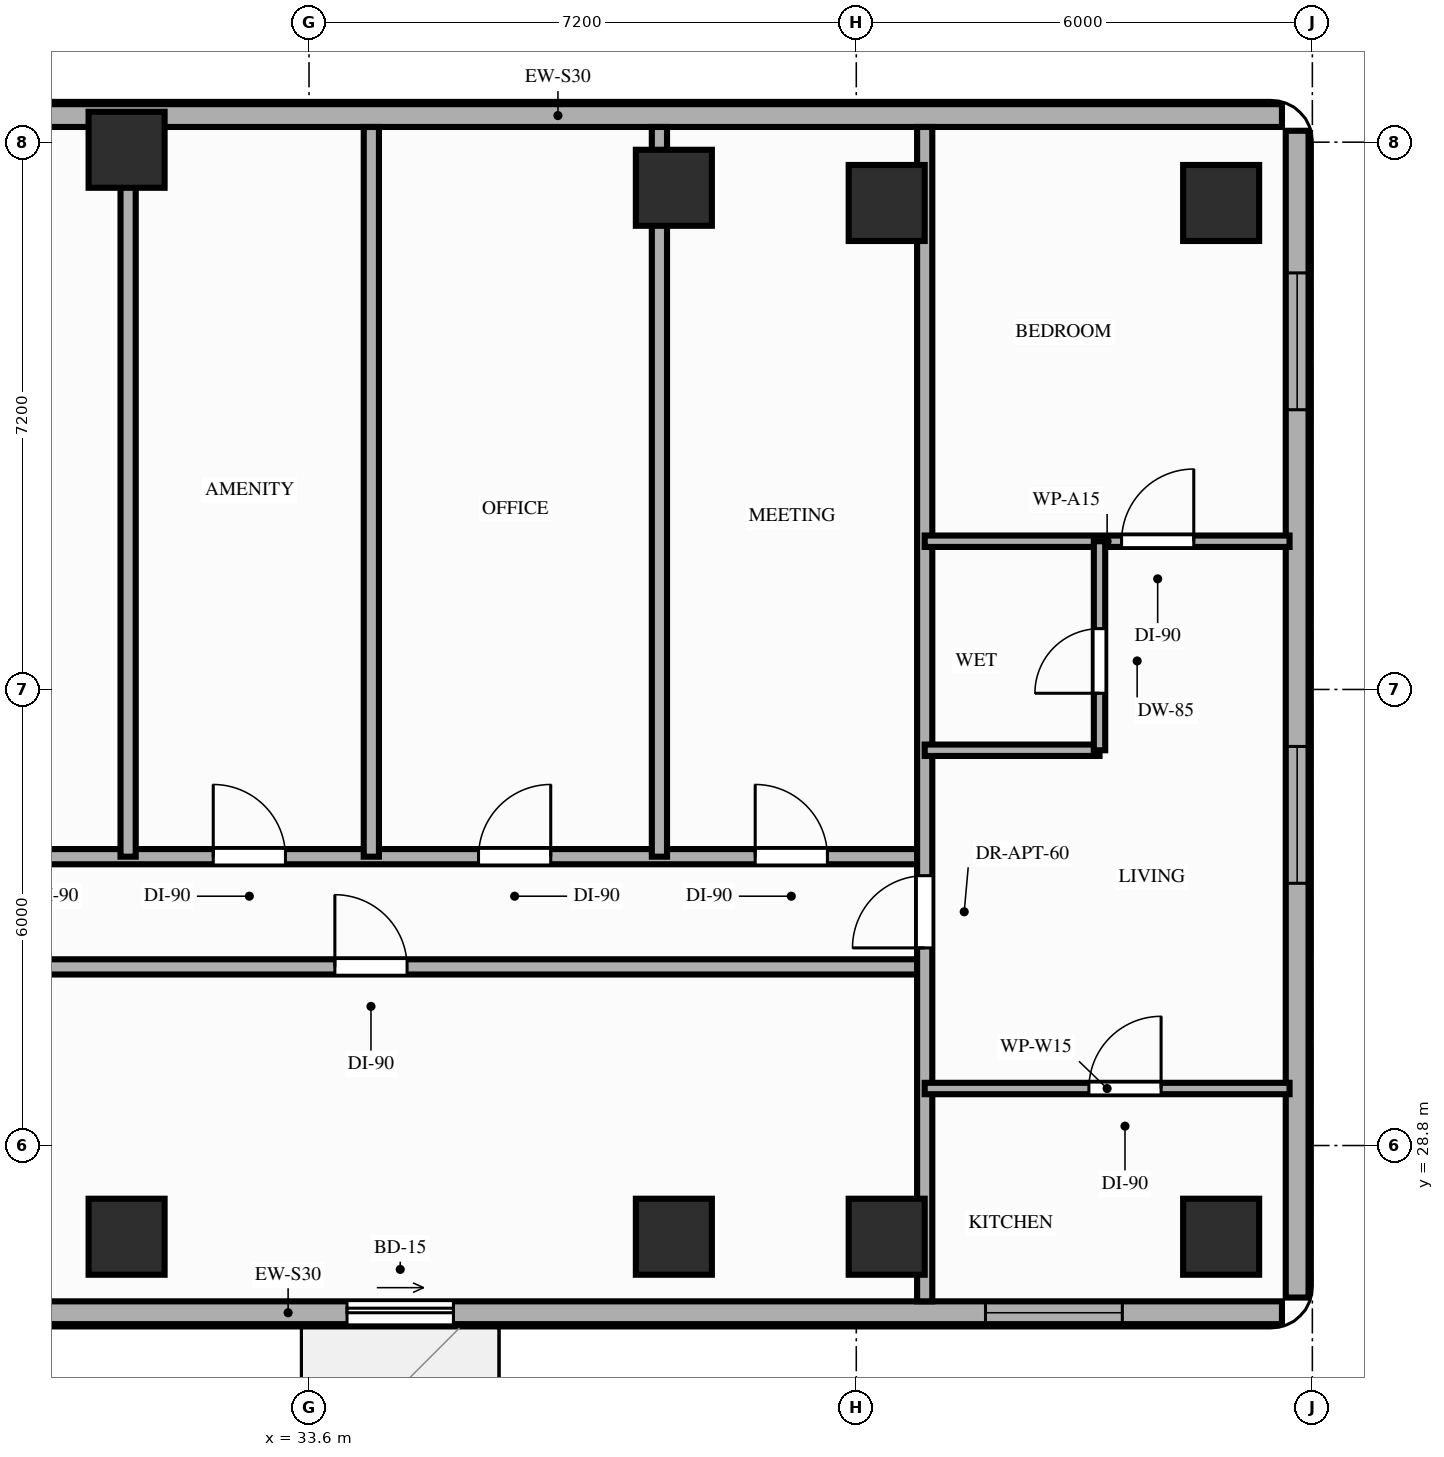
"""IFC4 building model, lengths in metres.
Left out: names, types, materials, properties, quantities, classifications, styles, units other than length and angle.
Written with IfcOpenShell. Run it as: python <this file> out.ifc"""

import sys

from ifc_helpers import new_model, si_unit, direction, frame, frame_2d, origin, origin_2d, place, context, subcontext, project, spatial, rectangle, extrude, element, fill, save


model = new_model("IFC4")
c1 = context("Model", 3, precision=1e-05, world=origin(), true_north=direction((0.0, 1.0)))
c2 = subcontext(c1, "Body", "Model", "MODEL_VIEW")
j1 = project(units=[si_unit("LENGTHUNIT", "METRE"), si_unit("PLANEANGLEUNIT", "RADIAN")], contexts=[c1])
p1 = place(None, origin())
s1 = spatial("IfcSite", under=j1, at=p1, CompositionType="ELEMENT")
p2 = place(p1, origin())
s2 = spatial("IfcBuilding", under=s1, at=p2, CompositionType="ELEMENT")
p3 = place(p2, frame((0.0, 0.0, 152.2)))
s3 = spatial("IfcBuildingStorey", under=s2, at=p3, CompositionType="ELEMENT", Elevation=152.2)
for number, where, z_axis, x_axis in (
    (1, (31.2, 27.6, 0.0), (0.0, 0.0, 1.0), (1.0, 0.0, 0.0)),
    (2, (31.2, 41.9, 0.0), (0.0, 0.0, 1.0), (1.0, 0.0, 0.0)),
    (3, (38.4, 27.6, 0.0), (0.0, 0.0, 1.0), (1.0, 0.0, 0.0)),
    (4, (38.4, 41.4, 0.0), (0.0, 0.0, 1.0), (1.0, 0.0, 0.0)),
    (5, (41.2, 27.6, 0.0), (0.0, 0.0, 1.0), (1.0, 0.0, 0.0)),
    (6, (41.2, 41.2, 0.0), (0.0, 0.0, 1.0), (1.0, 0.0, 0.0)),
    (7, (45.6, 27.6, 0.0), (0.0, 0.0, 1.0), (1.0, 0.0, 0.0)),
    (8, (45.6, 41.2, 0.0), (0.0, 0.0, 1.0), (1.0, 0.0, 0.0)),
):
    element("IfcColumn", number, at=place(p3, frame(where, z_axis=z_axis, x_axis=x_axis)), inside=s3, PredefinedType="COLUMN", context=c2, shape_type="SweptSolid", body=[
        extrude(rectangle(XDim=1.0, YDim=1.0, at=origin_2d()), origin(), (0.0, 0.0, 1.0), 3.8),
    ])
p4 = place(p3, frame((46.4, 42.35, 0.0), z_axis=(0.0, 0.0, 1.0), x_axis=(-1.0, 0.0, 0.0)))
e9 = element("IfcWall", 9, at=p4, inside=s3, PredefinedType="STANDARD", context=c2, shape_type="SweptSolid", body=[
    extrude(rectangle(XDim=19.05, YDim=0.3, at=frame_2d((9.525, 0.0))), origin(), (0.0, 0.0, 1.0), 2.99),
])
p5 = place(p4, frame((16.39, 0.0, 0.85)))
e10 = element("IfcOpeningElement", 10, at=p5, cuts=e9, PredefinedType="OPENING", context=c2, shape_type="SweptSolid", body=[
    extrude(rectangle(XDim=1.8, YDim=1.75, at=frame_2d((0.9, 0.875))), frame((0.0, 0.16, 0.0), z_axis=(0.0, -1.0, 0.0), x_axis=(1.0, 0.0, 0.0)), (0.0, 0.0, 1.0), 0.32),
])
p6 = place(p3, frame((20.25, 26.6, 0.0), z_axis=(0.0, 0.0, 1.0), x_axis=(1.0, 0.0, 0.0)))
e11 = element("IfcWall", 11, at=p6, inside=s3, PredefinedType="STANDARD", context=c2, shape_type="SweptSolid", body=[
    extrude(rectangle(XDim=26.15, YDim=0.3, at=frame_2d((13.075, 0.0))), origin(), (0.0, 0.0, 1.0), 3.56),
])
p7 = place(p6, frame((13.85, 0.0, 0.0)))
e12 = element("IfcOpeningElement", 12, at=p7, cuts=e11, PredefinedType="OPENING", context=c2, shape_type="SweptSolid", body=[
    extrude(rectangle(XDim=1.4, YDim=2.1, at=frame_2d((0.7, 1.05))), frame((0.0, 0.16, 0.0), z_axis=(0.0, -1.0, 0.0), x_axis=(1.0, 0.0, 0.0)), (0.0, 0.0, 1.0), 0.32),
])
p8 = place(p6, frame((2.65, 0.0, 0.85)))
e13 = element("IfcOpeningElement", 13, at=p8, cuts=e11, PredefinedType="OPENING", context=c2, shape_type="SweptSolid", body=[
    extrude(rectangle(XDim=1.8, YDim=1.75, at=frame_2d((0.9, 0.875))), frame((0.0, 0.16, 0.0), z_axis=(0.0, -1.0, 0.0), x_axis=(1.0, 0.0, 0.0)), (0.0, 0.0, 1.0), 0.32),
])
p9 = place(p6, frame((7.75, 0.0, 0.85)))
e14 = element("IfcOpeningElement", 14, at=p9, cuts=e11, PredefinedType="OPENING", context=c2, shape_type="SweptSolid", body=[
    extrude(rectangle(XDim=1.8, YDim=1.75, at=frame_2d((0.9, 0.875))), frame((0.0, 0.16, 0.0), z_axis=(0.0, -1.0, 0.0), x_axis=(1.0, 0.0, 0.0)), (0.0, 0.0, 1.0), 0.32),
])
p10 = place(p6, frame((22.25, 0.0, 0.85)))
e15 = element("IfcOpeningElement", 15, at=p10, cuts=e11, PredefinedType="OPENING", context=c2, shape_type="SweptSolid", body=[
    extrude(rectangle(XDim=1.8, YDim=1.75, at=frame_2d((0.9, 0.875))), frame((0.0, 0.16, 0.0), z_axis=(0.0, -1.0, 0.0), x_axis=(1.0, 0.0, 0.0)), (0.0, 0.0, 1.0), 0.32),
])
p11 = place(p3, frame((46.6, 26.8, 0.0), z_axis=(0.0, 0.0, 1.0), x_axis=(0.0, 1.0, 0.0)))
e16 = element("IfcWall", 16, at=p11, inside=s3, PredefinedType="STANDARD", context=c2, shape_type="SweptSolid", body=[
    extrude(rectangle(XDim=15.35, YDim=0.3, at=frame_2d((7.675, 0.0))), origin(), (0.0, 0.0, 1.0), 3.56),
])
p12 = place(p11, frame((5.45, 0.0, 0.85)))
e17 = element("IfcOpeningElement", 17, at=p12, cuts=e16, PredefinedType="OPENING", context=c2, shape_type="SweptSolid", body=[
    extrude(rectangle(XDim=1.8, YDim=1.75, at=frame_2d((0.9, 0.875))), frame((0.0, 0.16, 0.0), z_axis=(0.0, -1.0, 0.0), x_axis=(1.0, 0.0, 0.0)), (0.0, 0.0, 1.0), 0.32),
])
p13 = place(p11, frame((11.68, 0.0, 0.85)))
e18 = element("IfcOpeningElement", 18, at=p13, cuts=e16, PredefinedType="OPENING", context=c2, shape_type="SweptSolid", body=[
    extrude(rectangle(XDim=1.8, YDim=1.75, at=frame_2d((0.9, 0.875))), frame((0.0, 0.16, 0.0), z_axis=(0.0, -1.0, 0.0), x_axis=(1.0, 0.0, 0.0)), (0.0, 0.0, 1.0), 0.32),
])
p14 = place(p3, frame((27.15, 31.15, 0.0), z_axis=(0.0, 0.0, 1.0), x_axis=(1.0, 0.0, 0.0)))
e19 = element("IfcWall", 19, at=p14, inside=s3, PredefinedType="PARTITIONING", context=c2, shape_type="SweptSolid", body=[
    extrude(rectangle(XDim=14.55, YDim=0.2, at=frame_2d((7.275, 0.0))), origin(), (0.0, 0.0, 1.0), 2.99),
])
p15 = place(p14, frame((6.79, 0.0, 0.0)))
e20 = element("IfcOpeningElement", 20, at=p15, cuts=e19, PredefinedType="OPENING", context=c2, shape_type="SweptSolid", body=[
    extrude(rectangle(XDim=0.95, YDim=2.15, at=frame_2d((0.475, 1.075))), frame((0.0, 0.11, 0.0), z_axis=(0.0, -1.0, 0.0), x_axis=(1.0, 0.0, 0.0)), (0.0, 0.0, 1.0), 0.22),
])
p16 = place(p3, frame((27.15, 32.6, 0.0), z_axis=(0.0, 0.0, 1.0), x_axis=(1.0, 0.0, 0.0)))
e21 = element("IfcWall", 21, at=p16, inside=s3, PredefinedType="PARTITIONING", context=c2, shape_type="SweptSolid", body=[
    extrude(rectangle(XDim=14.55, YDim=0.2, at=frame_2d((7.275, 0.0))), origin(), (0.0, 0.0, 1.0), 2.99),
])
p17 = place(p16, frame((1.56, 0.0, 0.0)))
e22 = element("IfcOpeningElement", 22, at=p17, cuts=e21, PredefinedType="OPENING", context=c2, shape_type="SweptSolid", body=[
    extrude(rectangle(XDim=0.95, YDim=2.15, at=frame_2d((0.475, 1.075))), frame((0.0, 0.11, 0.0), z_axis=(0.0, -1.0, 0.0), x_axis=(1.0, 0.0, 0.0)), (0.0, 0.0, 1.0), 0.22),
])
p18 = place(p16, frame((5.19, 0.0, 0.0)))
e23 = element("IfcOpeningElement", 23, at=p18, cuts=e21, PredefinedType="OPENING", context=c2, shape_type="SweptSolid", body=[
    extrude(rectangle(XDim=0.95, YDim=2.15, at=frame_2d((0.475, 1.075))), frame((0.0, 0.11, 0.0), z_axis=(0.0, -1.0, 0.0), x_axis=(1.0, 0.0, 0.0)), (0.0, 0.0, 1.0), 0.22),
])
p19 = place(p16, frame((8.68, 0.0, 0.0)))
e24 = element("IfcOpeningElement", 24, at=p19, cuts=e21, PredefinedType="OPENING", context=c2, shape_type="SweptSolid", body=[
    extrude(rectangle(XDim=0.95, YDim=2.15, at=frame_2d((0.475, 1.075))), frame((0.0, 0.11, 0.0), z_axis=(0.0, -1.0, 0.0), x_axis=(1.0, 0.0, 0.0)), (0.0, 0.0, 1.0), 0.22),
])
p20 = place(p16, frame((12.32, 0.0, 0.0)))
e25 = element("IfcOpeningElement", 25, at=p20, cuts=e21, PredefinedType="OPENING", context=c2, shape_type="SweptSolid", body=[
    extrude(rectangle(XDim=0.95, YDim=2.15, at=frame_2d((0.475, 1.075))), frame((0.0, 0.11, 0.0), z_axis=(0.0, -1.0, 0.0), x_axis=(1.0, 0.0, 0.0)), (0.0, 0.0, 1.0), 0.22),
])
p21 = place(p3, frame((41.7, 26.75, 0.0), z_axis=(0.0, 0.0, 1.0), x_axis=(0.0, 1.0, 0.0)))
e26 = element("IfcWall", 26, at=p21, inside=s3, PredefinedType="PARTITIONING", context=c2, shape_type="SweptSolid", body=[
    extrude(rectangle(XDim=15.45, YDim=0.2, at=frame_2d((7.725, 0.0))), origin(), (0.0, 0.0, 1.0), 2.99),
])
p22 = place(p21, frame((4.65, 0.0, 0.0)))
e27 = element("IfcOpeningElement", 27, at=p22, cuts=e26, PredefinedType="OPENING", context=c2, shape_type="SweptSolid", body=[
    extrude(rectangle(XDim=0.95, YDim=2.15, at=frame_2d((0.475, 1.075))), frame((0.0, 0.11, 0.0), z_axis=(0.0, -1.0, 0.0), x_axis=(1.0, 0.0, 0.0)), (0.0, 0.0, 1.0), 0.22),
])
p23 = place(p3, frame((41.7, 29.55, 0.0), z_axis=(0.0, 0.0, 1.0), x_axis=(1.0, 0.0, 0.0)))
e28 = element("IfcWall", 28, at=p23, inside=s3, PredefinedType="PARTITIONING", context=c2, shape_type="SweptSolid", body=[
    extrude(rectangle(XDim=4.8, YDim=0.15, at=frame_2d((2.4, 0.0))), origin(), (0.0, 0.0, 1.0), 2.99),
])
p24 = place(p23, frame((2.16, 0.0, 0.0)))
e29 = element("IfcOpeningElement", 29, at=p24, cuts=e28, PredefinedType="OPENING", context=c2, shape_type="SweptSolid", body=[
    extrude(rectangle(XDim=0.95, YDim=2.15, at=frame_2d((0.475, 1.075))), frame((0.0, 0.085, 0.0), z_axis=(0.0, -1.0, 0.0), x_axis=(1.0, 0.0, 0.0)), (0.0, 0.0, 1.0), 0.17),
])
p25 = place(p3, frame((41.7, 36.75, 0.0), z_axis=(0.0, 0.0, 1.0), x_axis=(1.0, 0.0, 0.0)))
e30 = element("IfcWall", 30, at=p25, inside=s3, PredefinedType="PARTITIONING", context=c2, shape_type="SweptSolid", body=[
    extrude(rectangle(XDim=4.8, YDim=0.15, at=frame_2d((2.4, 0.0))), origin(), (0.0, 0.0, 1.0), 2.99),
])
p26 = place(p25, frame((2.59, 0.0, 0.0)))
e31 = element("IfcOpeningElement", 31, at=p26, cuts=e30, PredefinedType="OPENING", context=c2, shape_type="SweptSolid", body=[
    extrude(rectangle(XDim=0.95, YDim=2.15, at=frame_2d((0.475, 1.075))), frame((0.0, 0.085, 0.0), z_axis=(0.0, -1.0, 0.0), x_axis=(1.0, 0.0, 0.0)), (0.0, 0.0, 1.0), 0.17),
])
p27 = place(p3, frame((41.7, 34.0, 0.0), z_axis=(0.0, 0.0, 1.0), x_axis=(1.0, 0.0, 0.0)))
e32 = element("IfcWall", 32, at=p27, inside=s3, PredefinedType="PARTITIONING", context=c2, shape_type="SweptSolid", body=[
    extrude(rectangle(XDim=2.3, YDim=0.15, at=frame_2d((1.15, 0.0))), origin(), (0.0, 0.0, 1.0), 3.56),
])
p28 = place(p3, frame((44.0, 34.0, 0.0), z_axis=(0.0, 0.0, 1.0), x_axis=(0.0, 1.0, 0.0)))
e33 = element("IfcWall", 33, at=p28, inside=s3, PredefinedType="PARTITIONING", context=c2, shape_type="SweptSolid", body=[
    extrude(rectangle(XDim=2.75, YDim=0.15, at=frame_2d((1.375, 0.0))), origin(), (0.0, 0.0, 1.0), 3.15),
])
p29 = place(p28, frame((0.75, 0.0, 0.0)))
e34 = element("IfcOpeningElement", 34, at=p29, cuts=e33, PredefinedType="OPENING", context=c2, shape_type="SweptSolid", body=[
    extrude(rectangle(XDim=0.85, YDim=2.1, at=frame_2d((0.425, 1.05))), frame((0.0, 0.085, 0.0), z_axis=(0.0, -1.0, 0.0), x_axis=(1.0, 0.0, 0.0)), (0.0, 0.0, 1.0), 0.17),
])
for number, where, z_axis, x_axis in (
    (35, (31.22, 32.6, 0.0), (0.0, 0.0, 1.0), (0.0, 1.0, 0.0)),
    (36, (34.42, 32.6, 0.0), (0.0, 0.0, 1.0), (0.0, 1.0, 0.0)),
    (37, (38.21, 32.6, 0.0), (0.0, 0.0, 1.0), (0.0, 1.0, 0.0)),
):
    element("IfcWall", number, at=place(p3, frame(where, z_axis=z_axis, x_axis=x_axis)), inside=s3, PredefinedType="PARTITIONING", context=c2, shape_type="SweptSolid", body=[
        extrude(rectangle(XDim=9.6, YDim=0.2, at=frame_2d((4.8, 0.0))), origin(), (0.0, 0.0, 1.0), 2.99),
    ])
p30 = place(p7, origin())
e38 = element("IfcDoor", 38, at=p30, inside=s3, OperationType="SLIDING_TO_RIGHT", PredefinedType="DOOR", context=c2, shape_type="SweptSolid", body=[
    extrude(rectangle(XDim=1.4, YDim=2.1, at=frame_2d((0.7, 1.05))), frame((0.0, 0.025, 0.0), z_axis=(0.0, -1.0, 0.0), x_axis=(1.0, 0.0, 0.0)), (0.0, 0.0, 1.0), 0.05),
])
fill(e12, e38)
p31 = place(p12, origin())
e39 = element("IfcWindow", 39, at=p31, inside=s3, PartitioningType="SINGLE_PANEL", PredefinedType="WINDOW", context=c2, shape_type="SweptSolid", body=[
    extrude(rectangle(XDim=1.8, YDim=1.75, at=frame_2d((0.9, 0.875))), frame((0.0, 0.03, 0.0), z_axis=(0.0, -1.0, 0.0), x_axis=(1.0, 0.0, 0.0)), (0.0, 0.0, 1.0), 0.06),
])
fill(e17, e39)
p32 = place(p13, origin())
e40 = element("IfcWindow", 40, at=p32, inside=s3, PartitioningType="SINGLE_PANEL", PredefinedType="WINDOW", context=c2, shape_type="SweptSolid", body=[
    extrude(rectangle(XDim=1.8, YDim=1.75, at=frame_2d((0.9, 0.875))), frame((0.0, 0.03, 0.0), z_axis=(0.0, -1.0, 0.0), x_axis=(1.0, 0.0, 0.0)), (0.0, 0.0, 1.0), 0.06),
])
fill(e18, e40)
p33 = place(p10, origin())
e41 = element("IfcWindow", 41, at=p33, inside=s3, PartitioningType="SINGLE_PANEL", PredefinedType="WINDOW", context=c2, shape_type="SweptSolid", body=[
    extrude(rectangle(XDim=1.8, YDim=1.75, at=frame_2d((0.9, 0.875))), frame((0.0, 0.03, 0.0), z_axis=(0.0, -1.0, 0.0), x_axis=(1.0, 0.0, 0.0)), (0.0, 0.0, 1.0), 0.06),
])
fill(e15, e41)
p34 = place(p22, origin())
e42 = element("IfcDoor", 42, at=p34, inside=s3, OperationType="SINGLE_SWING_LEFT", PredefinedType="DOOR", context=c2, shape_type="SweptSolid", body=[
    extrude(rectangle(XDim=0.95, YDim=2.15, at=frame_2d((0.475, 1.075))), frame((0.0, 0.025, 0.0), z_axis=(0.0, -1.0, 0.0), x_axis=(1.0, 0.0, 0.0)), (0.0, 0.0, 1.0), 0.05),
])
fill(e27, e42)
p35 = place(p26, origin())
e43 = element("IfcDoor", 43, at=p35, inside=s3, OperationType="SINGLE_SWING_RIGHT", PredefinedType="DOOR", context=c2, shape_type="SweptSolid", body=[
    extrude(rectangle(XDim=0.95, YDim=2.15, at=frame_2d((0.475, 1.075))), frame((0.0, 0.025, 0.0), z_axis=(0.0, -1.0, 0.0), x_axis=(1.0, 0.0, 0.0)), (0.0, 0.0, 1.0), 0.05),
])
fill(e31, e43)
p36 = place(p29, origin())
e44 = element("IfcDoor", 44, at=p36, inside=s3, OperationType="SINGLE_SWING_LEFT", PredefinedType="DOOR", context=c2, shape_type="SweptSolid", body=[
    extrude(rectangle(XDim=0.85, YDim=2.1, at=frame_2d((0.425, 1.05))), frame((0.0, 0.025, 0.0), z_axis=(0.0, -1.0, 0.0), x_axis=(1.0, 0.0, 0.0)), (0.0, 0.0, 1.0), 0.05),
])
fill(e34, e44)
p37 = place(p24, origin())
e45 = element("IfcDoor", 45, at=p37, inside=s3, OperationType="SINGLE_SWING_RIGHT", PredefinedType="DOOR", context=c2, shape_type="SweptSolid", body=[
    extrude(rectangle(XDim=0.95, YDim=2.15, at=frame_2d((0.475, 1.075))), frame((0.0, 0.025, 0.0), z_axis=(0.0, -1.0, 0.0), x_axis=(1.0, 0.0, 0.0)), (0.0, 0.0, 1.0), 0.05),
])
fill(e29, e45)
p38 = place(p15, origin())
e46 = element("IfcDoor", 46, at=p38, inside=s3, OperationType="SINGLE_SWING_LEFT", PredefinedType="DOOR", context=c2, shape_type="SweptSolid", body=[
    extrude(rectangle(XDim=0.95, YDim=2.15, at=frame_2d((0.475, 1.075))), frame((0.0, 0.025, 0.0), z_axis=(0.0, -1.0, 0.0), x_axis=(1.0, 0.0, 0.0)), (0.0, 0.0, 1.0), 0.05),
])
fill(e20, e46)
p39 = place(p18, origin())
e47 = element("IfcDoor", 47, at=p39, inside=s3, OperationType="SINGLE_SWING_LEFT", PredefinedType="DOOR", context=c2, shape_type="SweptSolid", body=[
    extrude(rectangle(XDim=0.95, YDim=2.15, at=frame_2d((0.475, 1.075))), frame((0.0, 0.025, 0.0), z_axis=(0.0, -1.0, 0.0), x_axis=(1.0, 0.0, 0.0)), (0.0, 0.0, 1.0), 0.05),
])
fill(e23, e47)
p40 = place(p19, origin())
e48 = element("IfcDoor", 48, at=p40, inside=s3, OperationType="SINGLE_SWING_RIGHT", PredefinedType="DOOR", context=c2, shape_type="SweptSolid", body=[
    extrude(rectangle(XDim=0.95, YDim=2.15, at=frame_2d((0.475, 1.075))), frame((0.0, 0.025, 0.0), z_axis=(0.0, -1.0, 0.0), x_axis=(1.0, 0.0, 0.0)), (0.0, 0.0, 1.0), 0.05),
])
fill(e24, e48)
p41 = place(p20, origin())
e49 = element("IfcDoor", 49, at=p41, inside=s3, OperationType="SINGLE_SWING_LEFT", PredefinedType="DOOR", context=c2, shape_type="SweptSolid", body=[
    extrude(rectangle(XDim=0.95, YDim=2.15, at=frame_2d((0.475, 1.075))), frame((0.0, 0.025, 0.0), z_axis=(0.0, -1.0, 0.0), x_axis=(1.0, 0.0, 0.0)), (0.0, 0.0, 1.0), 0.05),
])
fill(e25, e49)
save(model, sys.argv[1])
